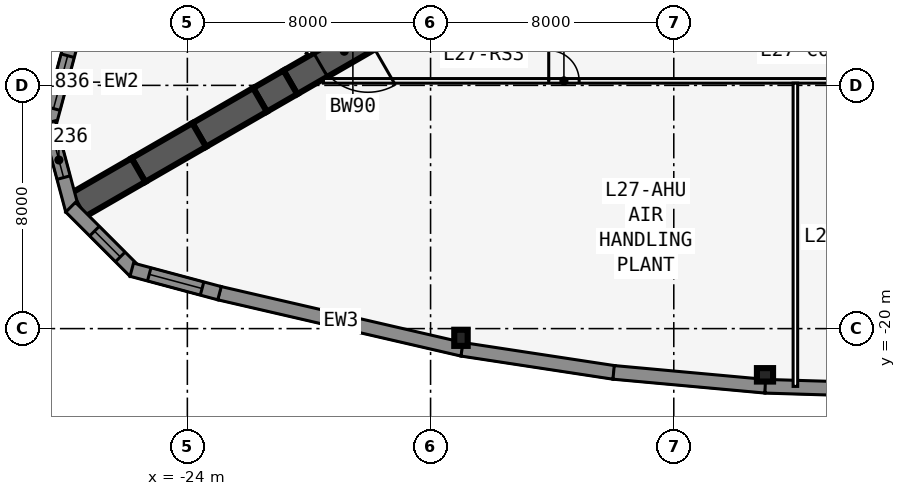
"""IFC4 building model, lengths in metres.
Left out: names, types, materials, properties, quantities, classifications, styles, units other than length and angle.
Written with IfcOpenShell. Run it as: python <this file> out.ifc"""

import sys

from ifc_helpers import new_model, si_unit, direction, frame, frame_2d, origin, origin_2d, place, context, subcontext, project, spatial, polyline, rectangle, i_section, outline, extrude, element, fill, save


model = new_model("IFC4")
c1 = context("Model", 3, precision=1e-05, world=origin(), true_north=direction((0.0, 1.0)))
c2 = subcontext(c1, "Body", "Model", "MODEL_VIEW")
j1 = project(units=[si_unit("LENGTHUNIT", "METRE"), si_unit("PLANEANGLEUNIT", "RADIAN")], contexts=[c1])
p1 = place(None, origin())
s1 = spatial("IfcSite", under=j1, at=p1, CompositionType="ELEMENT")
p2 = place(p1, origin())
s2 = spatial("IfcBuilding", under=s1, at=p2, CompositionType="ELEMENT")
p3 = place(p2, frame((0.0, 0.0, 103.3)))
s3 = spatial("IfcBuildingStorey", under=s2, at=p3, CompositionType="ELEMENT", Elevation=103.3)
p4 = place(p3, frame((-16.5, -9.526, 0.0), z_axis=(0.0, 0.0, 1.0), x_axis=(-0.866031398331, -0.499989616998, 0.0)))
e1 = element("IfcWall", 1, at=p4, inside=s3, PredefinedType="SHEAR", context=c2, shape_type="SweptSolid", body=[
    extrude(rectangle(XDim=4.746, YDim=0.9, at=frame_2d((2.373, 0.0))), origin(), (0.0, 0.0, 1.0), 6.4),
])
p5 = place(p4, frame((1.8, 0.0, 0.0)))
e2 = element("IfcOpeningElement", 2, at=p5, cuts=e1, PredefinedType="OPENING", context=c2, shape_type="SweptSolid", body=[
    extrude(rectangle(XDim=1.8, YDim=2.13, at=frame_2d((0.9, 1.065))), frame((0.0, 0.46, 0.0), z_axis=(0.0, -1.0, 0.0), x_axis=(1.0, 0.0, 0.0)), (0.0, 0.0, 1.0), 0.92),
])
p6 = place(p3, frame((-20.61, -11.899, 0.0), z_axis=(0.0, 0.0, 1.0), x_axis=(-0.866009537788, -0.500027479704, 0.0)))
e3 = element("IfcWall", 3, at=p6, inside=s3, PredefinedType="SHEAR", context=c2, shape_type="SweptSolid", body=[
    extrude(rectangle(XDim=1.155, YDim=0.9, at=frame_2d((0.577, 0.0))), origin(), (0.0, 0.0, 1.0), 6.4),
])
for number, where, z_axis, x_axis in (
    (4, (-21.61, -12.477, 0.0), (0.0, 0.0, 1.0), (-0.866, -0.5, 0.0)),
    (5, (-23.61, -13.631, 0.0), (0.0, 0.0, 1.0), (-0.866, -0.5, 0.0)),
    (6, (-25.61, -14.786, 0.0), (0.0, 0.0, 1.0), (-0.866, -0.5, 0.0)),
):
    element("IfcWall", number, at=place(p3, frame(where, z_axis=z_axis, x_axis=x_axis)), inside=s3, PredefinedType="SHEAR", context=c2, shape_type="SweptSolid", body=[
        extrude(rectangle(XDim=2.309, YDim=0.9, at=frame_2d((1.155, 0.0))), origin(), (0.0, 0.0, 1.0), 6.4),
    ])
for number, where, z_axis, x_axis in (
    (7, (-15.0, -20.303, 0.0), (0.0, 0.0, 1.0), (1.0, 0.0, 0.0)),
    (8, (-5.0, -21.521, 0.0), (0.0, 0.0, 1.0), (0.0, -1.0, 0.0)),
):
    element("IfcColumn", number, at=place(p3, frame(where, z_axis=z_axis, x_axis=x_axis)), inside=s3, PredefinedType="COLUMN", context=c2, shape_type="SweptSolid", body=[
        extrude(i_section(OverallWidth=0.442, OverallDepth=0.531, WebThickness=0.066, FlangeThickness=0.106, at=origin_2d()), origin(), (0.0, 0.0, 1.0), 6.4),
    ])
p7 = place(p3, frame((-22.949, -18.833, 0.0), z_axis=(0.0, 0.0, 1.0), x_axis=(0.974279327392, -0.225343720163, 0.0)))
e9 = element("IfcWall", 9, at=p7, inside=s3, PredefinedType="SOLIDWALL", context=c2, shape_type="SweptSolid", body=[
    extrude(outline(polyline([(0.0, 0.0), (8.211, 0.0), (8.211, 6.15), (0.0, 6.15), (0.0, 0.0)]), holes=[polyline([(6.556, 3.075), (6.472, 3.709), (6.227, 4.3), (5.838, 4.807), (5.331, 5.197), (4.74, 5.441), (4.106, 5.525), (3.471, 5.441), (2.881, 5.197), (2.373, 4.807), (1.984, 4.3), (1.739, 3.709), (1.656, 3.075), (1.739, 2.441), (1.984, 1.85), (2.373, 1.343), (2.881, 0.953), (3.471, 0.708), (4.106, 0.625), (4.74, 0.708), (5.331, 0.953), (5.838, 1.343), (6.227, 1.85), (6.472, 2.441), (6.556, 3.075)])]), frame((0.0, 0.225, 0.0), z_axis=(0.0, -1.0, 0.0), x_axis=(1.0, 0.0, 0.0)), (0.0, 0.0, 1.0), 0.45),
])
p8 = place(p3, frame((-14.966, -20.681, 0.0), z_axis=(0.0, 0.0, 1.0), x_axis=(0.988622582897, -0.150417381265, 0.0)))
e10 = element("IfcWall", 10, at=p8, inside=s3, PredefinedType="SOLIDWALL", context=c2, shape_type="SweptSolid", body=[
    extrude(outline(polyline([(0.0, 0.0), (5.058, 0.0), (5.058, 6.15), (0.0, 6.15), (0.0, 0.0)]), holes=[polyline([(4.429, 3.075), (4.364, 3.567), (4.174, 4.025), (3.872, 4.418), (3.479, 4.72), (3.021, 4.91), (2.529, 4.975), (2.037, 4.91), (1.579, 4.72), (1.185, 4.418), (0.883, 4.025), (0.694, 3.567), (0.629, 3.075), (0.694, 2.583), (0.883, 2.125), (1.185, 1.731), (1.579, 1.429), (2.037, 1.24), (2.529, 1.175), (3.021, 1.24), (3.479, 1.429), (3.872, 1.731), (4.174, 2.125), (4.364, 2.583), (4.429, 3.075)])]), frame((0.0, 0.225, 0.0), z_axis=(0.0, -1.0, 0.0), x_axis=(1.0, 0.0, 0.0)), (0.0, 0.0, 1.0), 0.45),
])
p9 = place(p3, frame((-9.979, -21.44, 0.0), z_axis=(0.0, 0.0, 1.0), x_axis=(0.995857256774, -0.090930325692, 0.0)))
e11 = element("IfcWall", 11, at=p9, inside=s3, PredefinedType="SOLIDWALL", context=c2, shape_type="SweptSolid", body=[
    extrude(outline(polyline([(0.0, 0.0), (5.021, 0.0), (5.021, 6.15), (0.0, 6.15), (0.0, 0.0)]), holes=[polyline([(4.41, 3.075), (4.346, 3.567), (4.156, 4.025), (3.854, 4.418), (3.46, 4.72), (3.002, 4.91), (2.51, 4.975), (2.019, 4.91), (1.56, 4.72), (1.167, 4.418), (0.865, 4.025), (0.675, 3.567), (0.61, 3.075), (0.675, 2.583), (0.865, 2.125), (1.167, 1.731), (1.56, 1.429), (2.019, 1.24), (2.51, 1.175), (3.002, 1.24), (3.46, 1.429), (3.854, 1.731), (4.156, 2.125), (4.346, 2.583), (4.41, 3.075)])]), frame((0.0, 0.225, 0.0), z_axis=(0.0, -1.0, 0.0), x_axis=(1.0, 0.0, 0.0)), (0.0, 0.0, 1.0), 0.45),
])
p10 = place(p3, frame((-4.993, -21.896, 0.0), z_axis=(0.0, 0.0, 1.0), x_axis=(0.999537635046, -0.030405856769, 0.0)))
e12 = element("IfcWall", 12, at=p10, inside=s3, PredefinedType="SOLIDWALL", context=c2, shape_type="SweptSolid", body=[
    extrude(outline(polyline([(0.0, 0.0), (5.002, 0.0), (5.002, 6.15), (0.0, 6.15), (0.0, 0.0)]), holes=[polyline([(4.401, 3.075), (4.336, 3.567), (4.146, 4.025), (3.845, 4.418), (3.451, 4.72), (2.993, 4.91), (2.501, 4.975), (2.01, 4.91), (1.551, 4.72), (1.158, 4.418), (0.856, 4.025), (0.666, 3.567), (0.601, 3.075), (0.666, 2.583), (0.856, 2.125), (1.158, 1.731), (1.551, 1.429), (2.01, 1.24), (2.501, 1.175), (2.993, 1.24), (3.451, 1.429), (3.845, 1.731), (4.146, 2.125), (4.336, 2.583), (4.401, 3.075)])]), frame((0.0, 0.225, 0.0), z_axis=(0.0, -1.0, 0.0), x_axis=(1.0, 0.0, 0.0)), (0.0, 0.0, 1.0), 0.45),
])
p11 = place(p3, frame((-27.783, -10.45, 0.0), z_axis=(0.0, 0.0, 1.0), x_axis=(-0.258780998834, -0.965936019953, 0.0)))
e13 = element("IfcWall", 13, at=p11, inside=s3, PredefinedType="SOLIDWALL", context=c2, shape_type="SweptSolid", body=[
    extrude(rectangle(XDim=2.989, YDim=0.45, at=frame_2d((1.494, 0.0))), origin(), (0.0, 0.0, 1.0), 6.15),
])
p12 = place(p11, frame((0.594, 0.0, 1.2)))
e14 = element("IfcOpeningElement", 14, at=p12, cuts=e13, PredefinedType="OPENING", context=c2, shape_type="SweptSolid", body=[
    extrude(rectangle(XDim=1.8, YDim=3.6, at=frame_2d((0.9, 1.8))), frame((0.0, 0.235, 0.0), z_axis=(0.0, -1.0, 0.0), x_axis=(1.0, 0.0, 0.0)), (0.0, 0.0, 1.0), 0.47),
])
p13 = place(p3, frame((-28.556, -13.221, 0.0), z_axis=(0.0, 0.0, 1.0), x_axis=(0.258801419081, -0.965930548995, 0.0)))
e15 = element("IfcWall", 15, at=p13, inside=s3, PredefinedType="SOLIDWALL", context=c2, shape_type="SweptSolid", body=[
    extrude(outline(polyline([(2.989, 0.225), (2.929, 0.225), (2.437, 0.093), (2.402, 0.225), (0.0, 0.225), (0.0, -0.225), (2.989, -0.225), (2.989, 0.225)])), origin(), (0.0, 0.0, 1.0), 6.15),
])
p14 = place(p13, frame((0.676, 0.0, 1.2)))
e16 = element("IfcOpeningElement", 16, at=p14, cuts=e15, PredefinedType="OPENING", context=c2, shape_type="SweptSolid", body=[
    extrude(rectangle(XDim=1.2, YDim=3.6, at=frame_2d((0.6, 1.8))), frame((0.0, 0.235, 0.0), z_axis=(0.0, -1.0, 0.0), x_axis=(1.0, 0.0, 0.0)), (0.0, 0.0, 1.0), 0.47),
])
p15 = place(p3, frame((-27.841, -16.007, 0.0), z_axis=(0.0, 0.0, 1.0), x_axis=(0.707025086683, -0.707188466253, 0.0)))
e17 = element("IfcWall", 17, at=p15, inside=s3, PredefinedType="SOLIDWALL", context=c2, shape_type="SweptSolid", body=[
    extrude(outline(polyline([(2.989, 0.225), (0.586, 0.225), (0.551, 0.093), (0.059, 0.225), (0.0, 0.225), (0.0, -0.225), (2.989, -0.225), (2.989, 0.225)])), origin(), (0.0, 0.0, 1.0), 6.15),
])
p16 = place(p15, frame((1.113, 0.0, 1.2)))
e18 = element("IfcOpeningElement", 18, at=p16, cuts=e17, PredefinedType="OPENING", context=c2, shape_type="SweptSolid", body=[
    extrude(rectangle(XDim=1.2, YDim=3.6, at=frame_2d((0.6, 1.8))), frame((0.0, 0.235, 0.0), z_axis=(0.0, -1.0, 0.0), x_axis=(1.0, 0.0, 0.0)), (0.0, 0.0, 1.0), 0.47),
])
p17 = place(p3, frame((-25.829, -18.062, 0.0), z_axis=(0.0, 0.0, 1.0), x_axis=(0.965930548995, -0.258801419081, 0.0)))
e19 = element("IfcWall", 19, at=p17, inside=s3, PredefinedType="SOLIDWALL", context=c2, shape_type="SweptSolid", body=[
    extrude(rectangle(XDim=2.989, YDim=0.45, at=frame_2d((1.494, 0.0))), origin(), (0.0, 0.0, 1.0), 6.15),
])
p18 = place(p17, frame((0.594, 0.0, 1.2)))
e20 = element("IfcOpeningElement", 20, at=p18, cuts=e19, PredefinedType="OPENING", context=c2, shape_type="SweptSolid", body=[
    extrude(rectangle(XDim=1.8, YDim=3.6, at=frame_2d((0.9, 1.8))), frame((0.0, 0.235, 0.0), z_axis=(0.0, -1.0, 0.0), x_axis=(1.0, 0.0, 0.0)), (0.0, 0.0, 1.0), 0.47),
])
p19 = place(p3, frame((-19.527, -11.851, 0.0), z_axis=(0.0, 0.0, 1.0), x_axis=(1.0, 0.0, 0.0)))
e21 = element("IfcWall", 21, at=p19, inside=s3, PredefinedType="PARTITIONING", context=c2, shape_type="SweptSolid", body=[
    extrude(rectangle(XDim=39.054, YDim=0.15, at=frame_2d((19.527, 0.0))), origin(), (0.0, 0.0, 1.0), 6.15),
])
p20 = place(p19, frame((7.414, 0.0, 0.0)))
e22 = element("IfcOpeningElement", 22, at=p20, cuts=e21, PredefinedType="OPENING", context=c2, shape_type="SweptSolid", body=[
    extrude(rectangle(XDim=1.0, YDim=2.13, at=frame_2d((0.5, 1.065))), frame((0.0, 0.085, 0.0), z_axis=(0.0, -1.0, 0.0), x_axis=(1.0, 0.0, 0.0)), (0.0, 0.0, 1.0), 0.17),
])
p21 = place(p19, frame((17.027, 0.0, 0.0)))
e23 = element("IfcOpeningElement", 23, at=p21, cuts=e21, PredefinedType="OPENING", context=c2, shape_type="SweptSolid", body=[
    extrude(rectangle(XDim=1.0, YDim=2.13, at=frame_2d((0.5, 1.065))), frame((0.0, 0.085, 0.0), z_axis=(0.0, -1.0, 0.0), x_axis=(1.0, 0.0, 0.0)), (0.0, 0.0, 1.0), 0.17),
])
p22 = place(p19, frame((28.64, 0.0, 0.0)))
e24 = element("IfcOpeningElement", 24, at=p22, cuts=e21, PredefinedType="OPENING", context=c2, shape_type="SweptSolid", body=[
    extrude(rectangle(XDim=1.0, YDim=2.13, at=frame_2d((0.5, 1.065))), frame((0.0, 0.085, 0.0), z_axis=(0.0, -1.0, 0.0), x_axis=(1.0, 0.0, 0.0)), (0.0, 0.0, 1.0), 0.17),
])
p23 = place(p3, frame((-4.0, -11.926, 0.0), z_axis=(0.0, 0.0, 1.0), x_axis=(0.0, -1.0, 0.0)))
e25 = element("IfcWall", 25, at=p23, inside=s3, PredefinedType="PARTITIONING", context=c2, shape_type="SweptSolid", body=[
    extrude(rectangle(XDim=9.974, YDim=0.15, at=frame_2d((4.987, 0.0))), origin(), (0.0, 0.0, 1.0), 6.15),
])
p24 = place(p3, frame((-0.5, 22.836, 0.0), z_axis=(0.0, 0.0, 1.0), x_axis=(-0.500001677587, -0.866024435227, 0.0)))
e26 = element("IfcWall", 26, at=p24, inside=s3, PredefinedType="PARTITIONING", context=c2, shape_type="SweptSolid", body=[
    extrude(rectangle(XDim=39.054, YDim=0.15, at=frame_2d((19.527, 0.0))), origin(), (0.0, 0.0, 1.0), 6.15),
])
p25 = place(p24, frame((9.414, 0.0, 0.0)))
e27 = element("IfcOpeningElement", 27, at=p25, cuts=e26, PredefinedType="OPENING", context=c2, shape_type="SweptSolid", body=[
    extrude(rectangle(XDim=1.0, YDim=2.13, at=frame_2d((0.5, 1.065))), frame((0.0, 0.085, 0.0), z_axis=(0.0, -1.0, 0.0), x_axis=(1.0, 0.0, 0.0)), (0.0, 0.0, 1.0), 0.17),
])
p26 = place(p24, frame((21.527, 0.0, 0.0)))
e28 = element("IfcOpeningElement", 28, at=p26, cuts=e26, PredefinedType="OPENING", context=c2, shape_type="SweptSolid", body=[
    extrude(rectangle(XDim=1.0, YDim=2.13, at=frame_2d((0.5, 1.065))), frame((0.0, 0.085, 0.0), z_axis=(0.0, -1.0, 0.0), x_axis=(1.0, 0.0, 0.0)), (0.0, 0.0, 1.0), 0.17),
])
p27 = place(p24, frame((31.14, 0.0, 0.0)))
e29 = element("IfcOpeningElement", 29, at=p27, cuts=e26, PredefinedType="OPENING", context=c2, shape_type="SweptSolid", body=[
    extrude(rectangle(XDim=1.0, YDim=2.13, at=frame_2d((0.5, 1.065))), frame((0.0, 0.085, 0.0), z_axis=(0.0, -1.0, 0.0), x_axis=(1.0, 0.0, 0.0)), (0.0, 0.0, 1.0), 0.17),
])
p28 = place(p12, origin())
e30 = element("IfcWindow", 30, at=p28, inside=s3, PartitioningType="SINGLE_PANEL", PredefinedType="WINDOW", context=c2, shape_type="SweptSolid", body=[
    extrude(rectangle(XDim=1.8, YDim=3.6, at=frame_2d((0.9, 1.8))), frame((0.0, 0.03, 0.0), z_axis=(0.0, -1.0, 0.0), x_axis=(1.0, 0.0, 0.0)), (0.0, 0.0, 1.0), 0.06),
])
fill(e14, e30)
p29 = place(p14, origin())
e31 = element("IfcWindow", 31, at=p29, inside=s3, PartitioningType="SINGLE_PANEL", PredefinedType="WINDOW", context=c2, shape_type="SweptSolid", body=[
    extrude(rectangle(XDim=1.2, YDim=3.6, at=frame_2d((0.6, 1.8))), frame((0.0, 0.03, 0.0), z_axis=(0.0, -1.0, 0.0), x_axis=(1.0, 0.0, 0.0)), (0.0, 0.0, 1.0), 0.06),
])
fill(e16, e31)
p30 = place(p16, origin())
e32 = element("IfcWindow", 32, at=p30, inside=s3, PartitioningType="SINGLE_PANEL", PredefinedType="WINDOW", context=c2, shape_type="SweptSolid", body=[
    extrude(rectangle(XDim=1.2, YDim=3.6, at=frame_2d((0.6, 1.8))), frame((0.0, 0.03, 0.0), z_axis=(0.0, -1.0, 0.0), x_axis=(1.0, 0.0, 0.0)), (0.0, 0.0, 1.0), 0.06),
])
fill(e18, e32)
p31 = place(p18, origin())
e33 = element("IfcWindow", 33, at=p31, inside=s3, PartitioningType="SINGLE_PANEL", PredefinedType="WINDOW", context=c2, shape_type="SweptSolid", body=[
    extrude(rectangle(XDim=1.8, YDim=3.6, at=frame_2d((0.9, 1.8))), frame((0.0, 0.03, 0.0), z_axis=(0.0, -1.0, 0.0), x_axis=(1.0, 0.0, 0.0)), (0.0, 0.0, 1.0), 0.06),
])
fill(e20, e33)
p32 = place(p20, origin())
e34 = element("IfcDoor", 34, at=p32, inside=s3, OperationType="SINGLE_SWING_LEFT", PredefinedType="DOOR", context=c2, shape_type="SweptSolid", body=[
    extrude(rectangle(XDim=1.0, YDim=2.13, at=frame_2d((0.5, 1.065))), frame((0.0, 0.025, 0.0), z_axis=(0.0, -1.0, 0.0), x_axis=(1.0, 0.0, 0.0)), (0.0, 0.0, 1.0), 0.05),
])
fill(e22, e34)
p33 = place(p5, origin())
e35 = element("IfcDoor", 35, at=p33, inside=s3, OperationType="DOUBLE_DOOR_DOUBLE_SWING", PredefinedType="DOOR", context=c2, shape_type="SweptSolid", body=[
    extrude(rectangle(XDim=1.8, YDim=2.13, at=frame_2d((0.9, 1.065))), frame((0.0, 0.025, 0.0), z_axis=(0.0, -1.0, 0.0), x_axis=(1.0, 0.0, 0.0)), (0.0, 0.0, 1.0), 0.05),
])
fill(e2, e35)
save(model, sys.argv[1])
